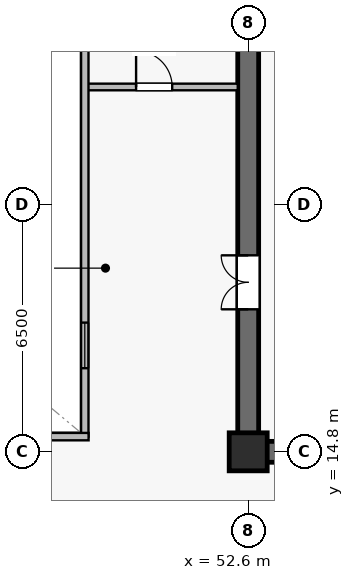
"""IFC4 building model, lengths in metres.
Left out: names, types, materials, properties, quantities, classifications, styles, units other than length and angle.
Written with IfcOpenShell. Run it as: python <this file> out.ifc"""

import sys

from ifc_helpers import new_model, si_unit, direction, frame, frame_2d, origin, origin_2d, place, context, subcontext, project, spatial, rectangle, extrude, source, transform, mapped, element, fill, save


model = new_model("IFC4")
c1 = context("Model", 3, precision=1e-05, world=origin(), true_north=direction((0.0, 1.0)))
c2 = subcontext(c1, "Body", "Model", "MODEL_VIEW")
j1 = project(units=[si_unit("LENGTHUNIT", "METRE"), si_unit("PLANEANGLEUNIT", "RADIAN")], contexts=[c1])
p1 = place(None, origin())
s1 = spatial("IfcSite", under=j1, at=p1, CompositionType="ELEMENT")
p2 = place(p1, origin())
s2 = spatial("IfcBuilding", under=s1, at=p2, CompositionType="ELEMENT")
p3 = place(p2, frame((0.0, 0.0, 287.5)))
s3 = spatial("IfcBuildingStorey", under=s2, at=p3, CompositionType="ELEMENT", Elevation=287.5)
p4 = place(p3, frame((52.325, 14.8, 0.0), z_axis=(0.0, 0.0, 1.0), x_axis=(1.0, 0.0, 0.0)))
e1 = element("IfcWall", 1, at=p4, inside=s3, PredefinedType="SHEAR", context=c2, shape_type="SweptSolid", body=[
    extrude(rectangle(XDim=15.35, YDim=0.55, at=frame_2d((7.675, 0.0))), origin(), (0.0, 0.0, 1.0), 3.8),
])
p5 = place(p3, frame((52.6, 15.075, 0.0), z_axis=(0.0, 0.0, 1.0), x_axis=(0.0, 1.0, 0.0)))
e2 = element("IfcWall", 2, at=p5, inside=s3, PredefinedType="SHEAR", context=c2, shape_type="SweptSolid", body=[
    extrude(rectangle(XDim=18.45, YDim=0.55, at=frame_2d((9.225, 0.0))), origin(), (0.0, 0.0, 1.0), 3.8),
])
p6 = place(p5, frame((3.475, 0.0, 0.0)))
e3 = element("IfcOpeningElement", 3, at=p6, cuts=e2, PredefinedType="OPENING", context=c2, shape_type="SweptSolid", body=[
    extrude(rectangle(XDim=1.42, YDim=2.2, at=frame_2d((0.71, 1.1))), frame((0.0, 0.285, 0.0), z_axis=(0.0, -1.0, 0.0), x_axis=(1.0, 0.0, 0.0)), (0.0, 0.0, 1.0), 0.57),
])
m1 = source(origin(), c2, "Body", "SweptSolid", [
    extrude(rectangle(XDim=1.0, YDim=1.0, at=origin_2d()), origin(), (0.0, 0.0, 1.0), 4.1),
])
p7 = place(p3, frame((52.6, 14.8, 0.0), z_axis=(0.0, 0.0, 1.0), x_axis=(1.0, 0.0, 0.0)))
e4 = element("IfcColumn", 4, at=p7, inside=s3, PredefinedType="COLUMN", context=c2, shape_type="MappedRepresentation", body=[
    mapped(m1, transform((0.0, 0.0, 0.0), scale=1.0)),
])
p8 = place(p3, frame((48.3, 24.4, 0.0), z_axis=(0.0, 0.0, 1.0), x_axis=(1.0, 0.0, 0.0)))
e5 = element("IfcWall", 5, at=p8, inside=s3, PredefinedType="PARTITIONING", context=c2, shape_type="SweptSolid", body=[
    extrude(rectangle(XDim=4.025, YDim=0.175, at=frame_2d((2.012, 0.0))), origin(), (0.0, 0.0, 1.0), 3.8),
])
p9 = place(p8, frame((1.35, 0.0, 0.0)))
e6 = element("IfcOpeningElement", 6, at=p9, cuts=e5, PredefinedType="OPENING", context=c2, shape_type="SweptSolid", body=[
    extrude(rectangle(XDim=0.95, YDim=2.15, at=frame_2d((0.475, 1.075))), frame((0.0, 0.098, 0.0), z_axis=(0.0, -1.0, 0.0), x_axis=(1.0, 0.0, 0.0)), (0.0, 0.0, 1.0), 0.195),
])
p10 = place(p3, frame((48.3, 15.2, 0.0), z_axis=(0.0, 0.0, 1.0), x_axis=(0.0, 1.0, 0.0)))
e7 = element("IfcWall", 7, at=p10, inside=s3, PredefinedType="SOLIDWALL", context=c2, shape_type="SweptSolid", body=[
    extrude(rectangle(XDim=18.2, YDim=0.195, at=frame_2d((9.1, 0.0))), origin(), (0.0, 0.0, 1.0), 3.8),
])
p11 = place(p10, frame((1.8, 0.0, 0.9)))
e8 = element("IfcOpeningElement", 8, at=p11, cuts=e7, PredefinedType="OPENING", context=c2, shape_type="SweptSolid", body=[
    extrude(rectangle(XDim=1.2, YDim=1.35, at=frame_2d((0.6, 0.675))), frame((0.0, 0.107, 0.0), z_axis=(0.0, -1.0, 0.0), x_axis=(1.0, 0.0, 0.0)), (0.0, 0.0, 1.0), 0.215),
])
p12 = place(p10, frame((13.2, 0.0, 0.9)))
e9 = element("IfcOpeningElement", 9, at=p12, cuts=e7, PredefinedType="OPENING", context=c2, shape_type="SweptSolid", body=[
    extrude(rectangle(XDim=1.2, YDim=1.35, at=frame_2d((0.6, 0.675))), frame((0.0, 0.107, 0.0), z_axis=(0.0, -1.0, 0.0), x_axis=(1.0, 0.0, 0.0)), (0.0, 0.0, 1.0), 0.215),
])
p13 = place(p3, frame((26.4, 15.2, 0.0), z_axis=(0.0, 0.0, 1.0), x_axis=(1.0, 0.0, 0.0)))
e10 = element("IfcWall", 10, at=p13, inside=s3, PredefinedType="SOLIDWALL", context=c2, shape_type="SweptSolid", body=[
    extrude(rectangle(XDim=22.0, YDim=0.195, at=frame_2d((11.0, 0.0))), origin(), (0.0, 0.0, 1.0), 3.8),
])
m2 = source(origin(), c2, "Body", "SweptSolid", [
    extrude(rectangle(XDim=1.2, YDim=1.35, at=frame_2d((0.6, 0.675))), frame((0.0, 0.03, 0.0), z_axis=(0.0, -1.0, 0.0), x_axis=(1.0, 0.0, 0.0)), (0.0, 0.0, 1.0), 0.06),
])
p14 = place(p11, origin())
e11 = element("IfcWindow", 11, at=p14, inside=s3, PartitioningType="SINGLE_PANEL", PredefinedType="WINDOW", context=c2, shape_type="MappedRepresentation", body=[
    mapped(m2, transform((0.0, 0.0, 0.0), scale=1.0)),
])
fill(e8, e11)
m3 = source(origin(), c2, "Body", "SweptSolid", [
    extrude(rectangle(XDim=1.42, YDim=2.2, at=frame_2d((0.71, 1.1))), frame((0.0, 0.025, 0.0), z_axis=(0.0, -1.0, 0.0), x_axis=(1.0, 0.0, 0.0)), (0.0, 0.0, 1.0), 0.05),
])
p15 = place(p6, origin())
e12 = element("IfcDoor", 12, at=p15, inside=s3, OperationType="DOUBLE_DOOR_SINGLE_SWING", PredefinedType="DOOR", context=c2, shape_type="MappedRepresentation", body=[
    mapped(m3, transform((0.0, 0.0, 0.0), scale=1.0)),
])
fill(e3, e12)
m4 = source(origin(), c2, "Body", "SweptSolid", [
    extrude(rectangle(XDim=0.95, YDim=2.15, at=frame_2d((0.475, 1.075))), frame((0.0, 0.025, 0.0), z_axis=(0.0, -1.0, 0.0), x_axis=(1.0, 0.0, 0.0)), (0.0, 0.0, 1.0), 0.05),
])
p16 = place(p9, origin())
e13 = element("IfcDoor", 13, at=p16, inside=s3, OperationType="SINGLE_SWING_LEFT", PredefinedType="DOOR", context=c2, shape_type="MappedRepresentation", body=[
    mapped(m4, transform((0.0, 0.0, 0.0), scale=1.0)),
])
fill(e6, e13)
save(model, sys.argv[1])
